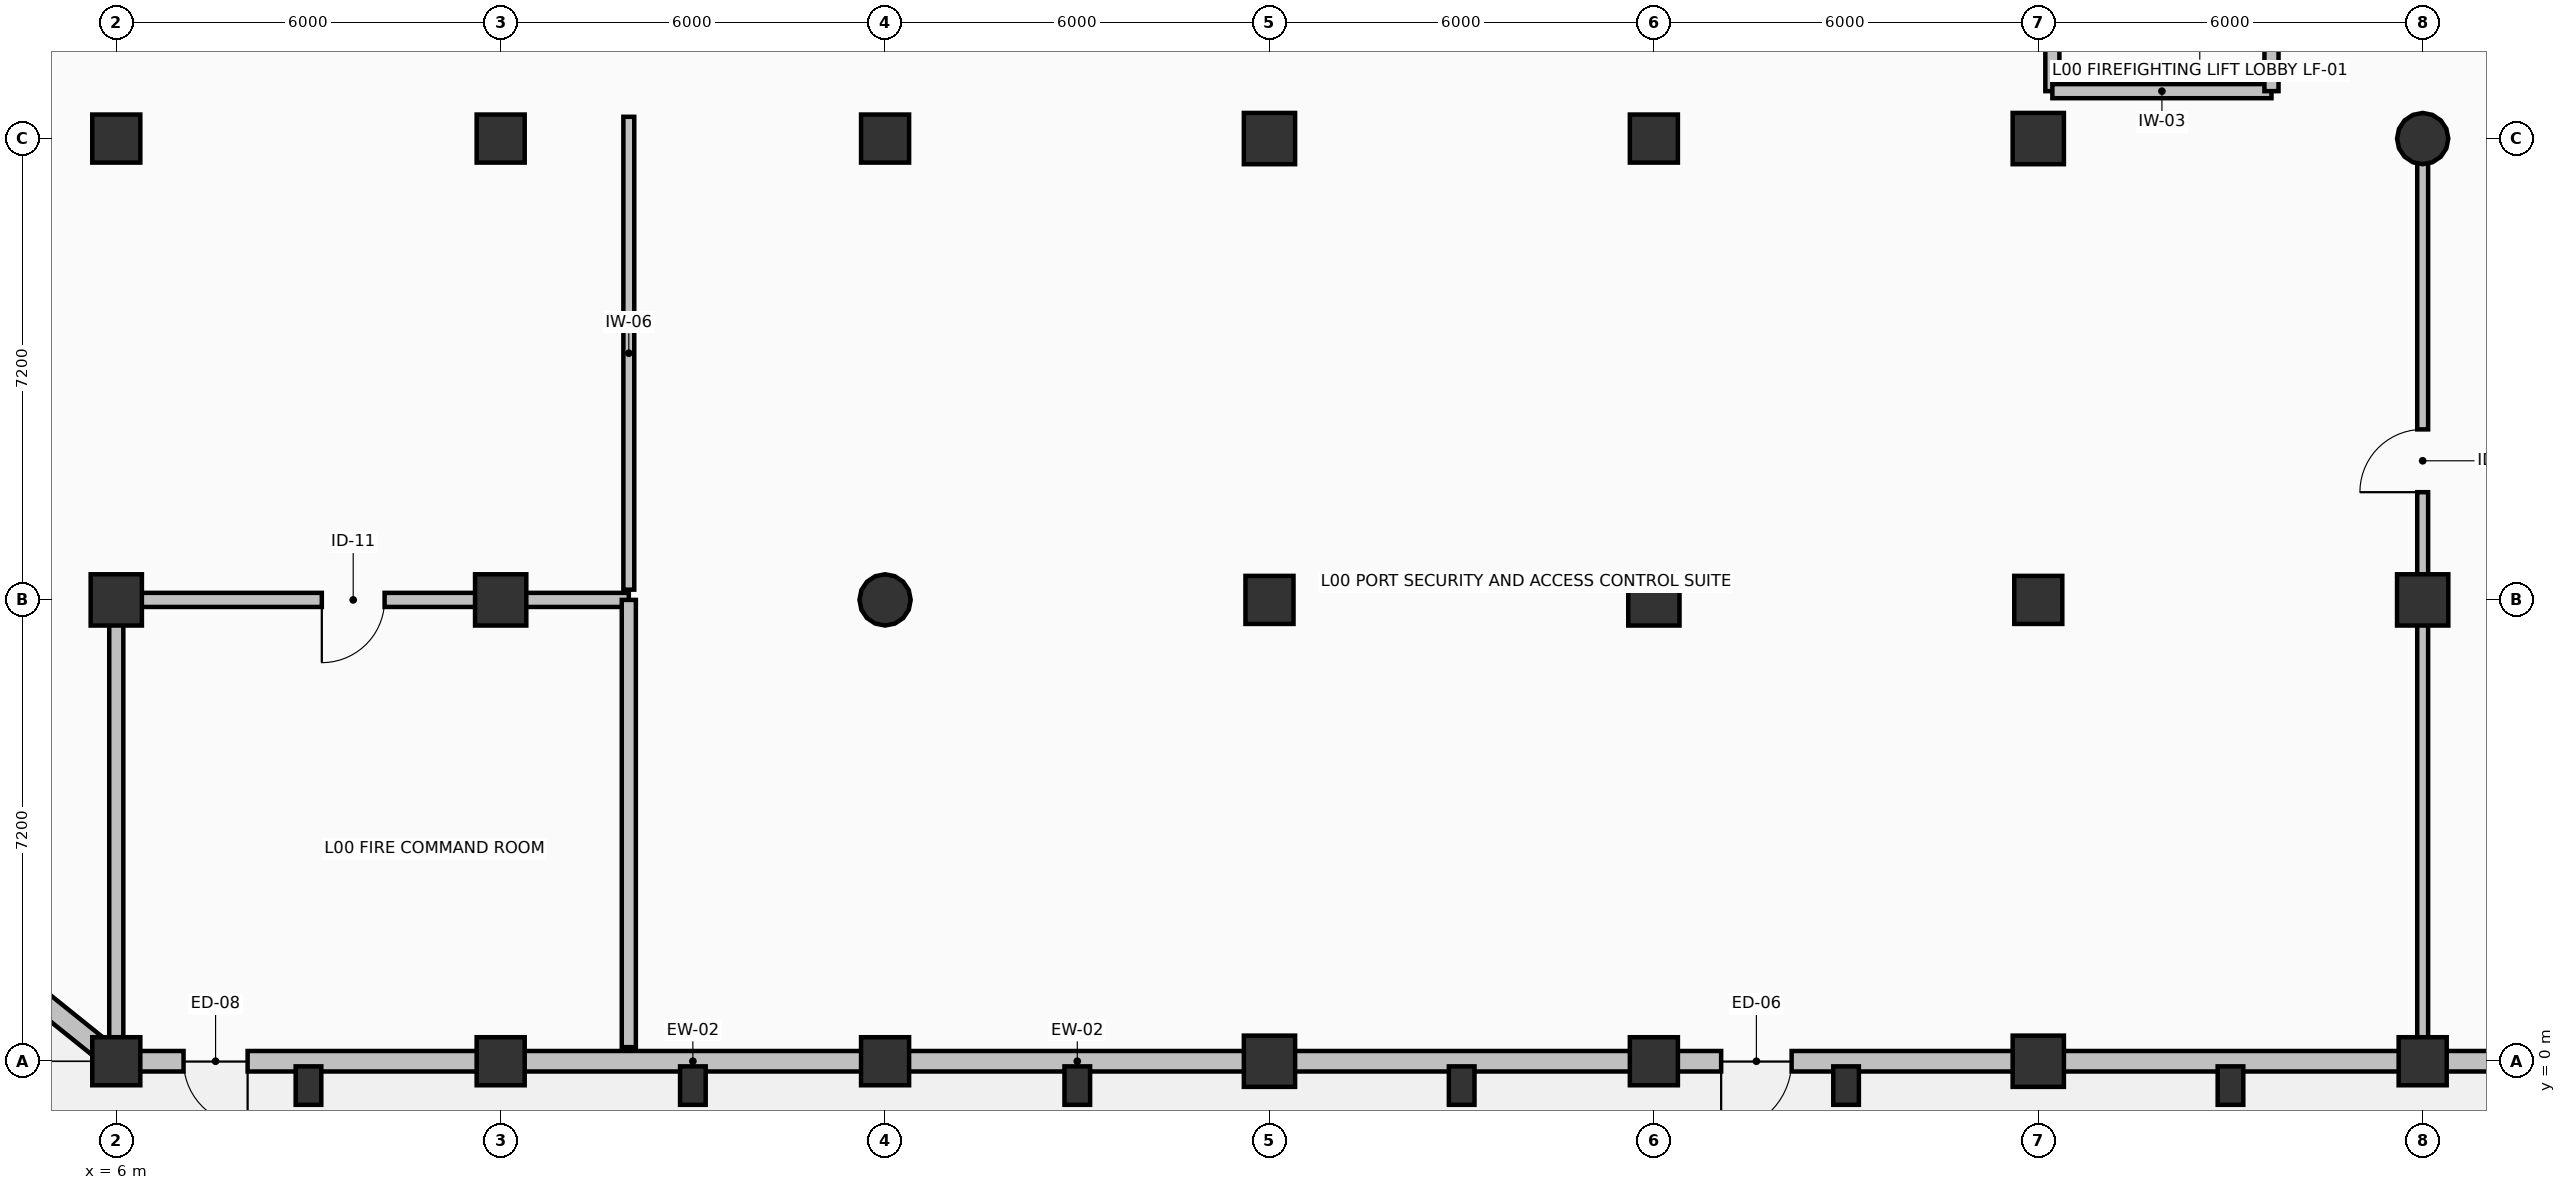
"""IFC4 building model, lengths in metres.
Left out: names, types, materials, properties, quantities, classifications, styles, units other than length and angle.
Written with IfcOpenShell. Run it as: python <this file> out.ifc"""

import sys

from ifc_helpers import new_model, si_unit, direction, frame, frame_2d, origin, origin_2d, place, context, subcontext, project, spatial, rectangle, circle, extrude, element, fill, save


model = new_model("IFC4")
c1 = context("Model", 3, precision=1e-05, world=origin(), true_north=direction((0.0, 1.0)))
c2 = subcontext(c1, "Body", "Model", "MODEL_VIEW")
j1 = project(units=[si_unit("LENGTHUNIT", "METRE"), si_unit("PLANEANGLEUNIT", "RADIAN")], contexts=[c1])
p1 = place(None, origin())
s1 = spatial("IfcSite", under=j1, at=p1, CompositionType="ELEMENT")
p2 = place(p1, origin())
s2 = spatial("IfcBuilding", under=s1, at=p2, CompositionType="ELEMENT")
p3 = place(p2, origin())
s3 = spatial("IfcBuildingStorey", under=s2, at=p3, CompositionType="ELEMENT", Elevation=0.0)
p4 = place(p3, frame((6.0, 0.0, 0.0), z_axis=(0.0, 0.0, 1.0), x_axis=(1.0, 0.0, 0.0)))
e1 = element("IfcColumn", 1, at=p4, inside=s3, PredefinedType="COLUMN", context=c2, shape_type="SweptSolid", body=[
    extrude(rectangle(XDim=0.75, YDim=0.75, at=origin_2d()), origin(), (0.0, 0.0, 1.0), 5.76),
])
p5 = place(p3, frame((6.0, 7.2, 0.0), z_axis=(0.0, 0.0, 1.0), x_axis=(1.0, 0.0, 0.0)))
e2 = element("IfcColumn", 2, at=p5, inside=s3, PredefinedType="COLUMN", context=c2, shape_type="SweptSolid", body=[
    extrude(rectangle(XDim=0.8, YDim=0.8, at=origin_2d()), origin(), (0.0, 0.0, 1.0), 5.76),
])
for number, where, z_axis, x_axis in (
    (3, (6.0, 14.4, 0.0), (0.0, 0.0, 1.0), (1.0, 0.0, 0.0)),
    (4, (12.0, 0.0, 0.0), (0.0, 0.0, 1.0), (1.0, 0.0, 0.0)),
):
    element("IfcColumn", number, at=place(p3, frame(where, z_axis=z_axis, x_axis=x_axis)), inside=s3, PredefinedType="COLUMN", context=c2, shape_type="SweptSolid", body=[
        extrude(rectangle(XDim=0.75, YDim=0.75, at=origin_2d()), origin(), (0.0, 0.0, 1.0), 5.76),
    ])
p6 = place(p3, frame((12.0, 7.2, 0.0), z_axis=(0.0, 0.0, 1.0), x_axis=(1.0, 0.0, 0.0)))
e5 = element("IfcColumn", 5, at=p6, inside=s3, PredefinedType="COLUMN", context=c2, shape_type="SweptSolid", body=[
    extrude(rectangle(XDim=0.8, YDim=0.8, at=origin_2d()), origin(), (0.0, 0.0, 1.0), 5.76),
])
for number, where, z_axis, x_axis in (
    (6, (12.0, 14.4, 0.0), (0.0, 0.0, 1.0), (1.0, 0.0, 0.0)),
    (7, (18.0, 0.0, 0.0), (0.0, 0.0, 1.0), (1.0, 0.0, 0.0)),
):
    element("IfcColumn", number, at=place(p3, frame(where, z_axis=z_axis, x_axis=x_axis)), inside=s3, PredefinedType="COLUMN", context=c2, shape_type="SweptSolid", body=[
        extrude(rectangle(XDim=0.75, YDim=0.75, at=origin_2d()), origin(), (0.0, 0.0, 1.0), 5.76),
    ])
p7 = place(p3, frame((18.0, 7.2, 0.0), z_axis=(0.0, 0.0, 1.0), x_axis=(1.0, 0.0, 0.0)))
e8 = element("IfcColumn", 8, at=p7, inside=s3, PredefinedType="COLUMN", context=c2, shape_type="SweptSolid", body=[
    extrude(circle(Radius=0.4, at=origin_2d()), origin(), (0.0, 0.0, 1.0), 5.76),
])
p8 = place(p3, frame((18.0, 14.4, 0.0), z_axis=(0.0, 0.0, 1.0), x_axis=(1.0, 0.0, 0.0)))
e9 = element("IfcColumn", 9, at=p8, inside=s3, PredefinedType="COLUMN", context=c2, shape_type="SweptSolid", body=[
    extrude(rectangle(XDim=0.75, YDim=0.75, at=origin_2d()), origin(), (0.0, 0.0, 1.0), 5.76),
])
p9 = place(p3, frame((24.0, 0.0, 0.0), z_axis=(0.0, 0.0, 1.0), x_axis=(1.0, 0.0, 0.0)))
e10 = element("IfcColumn", 10, at=p9, inside=s3, PredefinedType="COLUMN", context=c2, shape_type="SweptSolid", body=[
    extrude(rectangle(XDim=0.8, YDim=0.8, at=origin_2d()), origin(), (0.0, 0.0, 1.0), 5.76),
])
p10 = place(p3, frame((24.0, 7.2, 0.0), z_axis=(0.0, 0.0, 1.0), x_axis=(1.0, 0.0, 0.0)))
e11 = element("IfcColumn", 11, at=p10, inside=s3, PredefinedType="COLUMN", context=c2, shape_type="SweptSolid", body=[
    extrude(rectangle(XDim=0.75, YDim=0.75, at=origin_2d()), origin(), (0.0, 0.0, 1.0), 5.76),
])
p11 = place(p3, frame((24.0, 14.4, 0.0), z_axis=(0.0, 0.0, 1.0), x_axis=(1.0, 0.0, 0.0)))
e12 = element("IfcColumn", 12, at=p11, inside=s3, PredefinedType="COLUMN", context=c2, shape_type="SweptSolid", body=[
    extrude(rectangle(XDim=0.8, YDim=0.8, at=origin_2d()), origin(), (0.0, 0.0, 1.0), 5.76),
])
p12 = place(p3, frame((30.0, 0.0, 0.0), z_axis=(0.0, 0.0, 1.0), x_axis=(1.0, 0.0, 0.0)))
e13 = element("IfcColumn", 13, at=p12, inside=s3, PredefinedType="COLUMN", context=c2, shape_type="SweptSolid", body=[
    extrude(rectangle(XDim=0.75, YDim=0.75, at=origin_2d()), origin(), (0.0, 0.0, 1.0), 5.76),
])
p13 = place(p3, frame((30.0, 7.2, 0.0), z_axis=(0.0, 0.0, 1.0), x_axis=(1.0, 0.0, 0.0)))
e14 = element("IfcColumn", 14, at=p13, inside=s3, PredefinedType="COLUMN", context=c2, shape_type="SweptSolid", body=[
    extrude(rectangle(XDim=0.8, YDim=0.8, at=origin_2d()), origin(), (0.0, 0.0, 1.0), 5.76),
])
p14 = place(p3, frame((30.0, 14.4, 0.0), z_axis=(0.0, 0.0, 1.0), x_axis=(1.0, 0.0, 0.0)))
e15 = element("IfcColumn", 15, at=p14, inside=s3, PredefinedType="COLUMN", context=c2, shape_type="SweptSolid", body=[
    extrude(rectangle(XDim=0.75, YDim=0.75, at=origin_2d()), origin(), (0.0, 0.0, 1.0), 5.76),
])
p15 = place(p3, frame((36.0, 0.0, 0.0), z_axis=(0.0, 0.0, 1.0), x_axis=(1.0, 0.0, 0.0)))
e16 = element("IfcColumn", 16, at=p15, inside=s3, PredefinedType="COLUMN", context=c2, shape_type="SweptSolid", body=[
    extrude(rectangle(XDim=0.8, YDim=0.8, at=origin_2d()), origin(), (0.0, 0.0, 1.0), 5.76),
])
p16 = place(p3, frame((36.0, 7.2, 0.0), z_axis=(0.0, 0.0, 1.0), x_axis=(1.0, 0.0, 0.0)))
e17 = element("IfcColumn", 17, at=p16, inside=s3, PredefinedType="COLUMN", context=c2, shape_type="SweptSolid", body=[
    extrude(rectangle(XDim=0.75, YDim=0.75, at=origin_2d()), origin(), (0.0, 0.0, 1.0), 5.76),
])
p17 = place(p3, frame((36.0, 14.4, 0.0), z_axis=(0.0, 0.0, 1.0), x_axis=(1.0, 0.0, 0.0)))
e18 = element("IfcColumn", 18, at=p17, inside=s3, PredefinedType="COLUMN", context=c2, shape_type="SweptSolid", body=[
    extrude(rectangle(XDim=0.8, YDim=0.8, at=origin_2d()), origin(), (0.0, 0.0, 1.0), 5.76),
])
p18 = place(p3, frame((42.0, 0.0, 0.0), z_axis=(0.0, 0.0, 1.0), x_axis=(1.0, 0.0, 0.0)))
e19 = element("IfcColumn", 19, at=p18, inside=s3, PredefinedType="COLUMN", context=c2, shape_type="SweptSolid", body=[
    extrude(rectangle(XDim=0.75, YDim=0.75, at=origin_2d()), origin(), (0.0, 0.0, 1.0), 5.76),
])
p19 = place(p3, frame((42.0, 7.2, 0.0), z_axis=(0.0, 0.0, 1.0), x_axis=(1.0, 0.0, 0.0)))
e20 = element("IfcColumn", 20, at=p19, inside=s3, PredefinedType="COLUMN", context=c2, shape_type="SweptSolid", body=[
    extrude(rectangle(XDim=0.8, YDim=0.8, at=origin_2d()), origin(), (0.0, 0.0, 1.0), 5.76),
])
p20 = place(p3, frame((42.0, 14.4, 0.0), z_axis=(0.0, 0.0, 1.0), x_axis=(1.0, 0.0, 0.0)))
e21 = element("IfcColumn", 21, at=p20, inside=s3, PredefinedType="COLUMN", context=c2, shape_type="SweptSolid", body=[
    extrude(circle(Radius=0.4, at=origin_2d()), origin(), (0.0, 0.0, 1.0), 5.76),
])
for number, where, z_axis, x_axis in (
    (22, (9.0, -0.38, 0.0), (0.0, 0.0, 1.0), (1.0, 0.0, 0.0)),
    (23, (15.0, -0.38, 0.0), (0.0, 0.0, 1.0), (1.0, 0.0, 0.0)),
    (24, (21.0, -0.38, 0.0), (0.0, 0.0, 1.0), (1.0, 0.0, 0.0)),
    (25, (27.0, -0.38, 0.0), (0.0, 0.0, 1.0), (1.0, 0.0, 0.0)),
    (26, (33.0, -0.38, 0.0), (0.0, 0.0, 1.0), (1.0, 0.0, 0.0)),
    (27, (39.0, -0.38, 0.0), (0.0, 0.0, 1.0), (1.0, 0.0, 0.0)),
):
    element("IfcColumn", number, at=place(p3, frame(where, z_axis=z_axis, x_axis=x_axis)), inside=s3, PredefinedType="PILASTER", context=c2, shape_type="SweptSolid", body=[
        extrude(rectangle(XDim=0.4, YDim=0.6, at=origin_2d()), origin(), (0.0, 0.0, 1.0), 5.76),
    ])
p21 = place(p3, frame((6.0, 0.0, 0.0), z_axis=(0.0, 0.0, 1.0), x_axis=(1.0, 0.0, 0.0)))
e28 = element("IfcWall", 28, at=p21, inside=s3, PredefinedType="SOLIDWALL", context=c2, shape_type="SweptSolid", body=[
    extrude(rectangle(XDim=6.0, YDim=0.32, at=frame_2d((3.0, 0.0))), origin(), (0.0, 0.0, 1.0), 4.79),
])
p22 = place(p21, frame((1.05, 0.0, 0.0)))
e29 = element("IfcOpeningElement", 29, at=p22, cuts=e28, PredefinedType="OPENING", context=c2, shape_type="SweptSolid", body=[
    extrude(rectangle(XDim=1.0, YDim=2.1, at=frame_2d((0.5, 1.05))), frame((0.0, 0.17, 0.0), z_axis=(0.0, -1.0, 0.0), x_axis=(1.0, 0.0, 0.0)), (0.0, 0.0, 1.0), 0.34),
])
for number, where, z_axis, x_axis in (
    (30, (12.0, 0.0, 0.0), (0.0, 0.0, 1.0), (1.0, 0.0, 0.0)),
    (31, (18.0, 0.0, 0.0), (0.0, 0.0, 1.0), (1.0, 0.0, 0.0)),
    (32, (24.0, 0.0, 0.0), (0.0, 0.0, 1.0), (1.0, 0.0, 0.0)),
):
    element("IfcWall", number, at=place(p3, frame(where, z_axis=z_axis, x_axis=x_axis)), inside=s3, PredefinedType="SOLIDWALL", context=c2, shape_type="SweptSolid", body=[
        extrude(rectangle(XDim=6.0, YDim=0.32, at=frame_2d((3.0, 0.0))), origin(), (0.0, 0.0, 1.0), 4.79),
    ])
p23 = place(p3, frame((30.0, 0.0, 0.0), z_axis=(0.0, 0.0, 1.0), x_axis=(1.0, 0.0, 0.0)))
e33 = element("IfcWall", 33, at=p23, inside=s3, PredefinedType="SOLIDWALL", context=c2, shape_type="SweptSolid", body=[
    extrude(rectangle(XDim=6.0, YDim=0.32, at=frame_2d((3.0, 0.0))), origin(), (0.0, 0.0, 1.0), 4.79),
])
p24 = place(p23, frame((1.05, 0.0, 0.0)))
e34 = element("IfcOpeningElement", 34, at=p24, cuts=e33, PredefinedType="OPENING", context=c2, shape_type="SweptSolid", body=[
    extrude(rectangle(XDim=1.1, YDim=2.15, at=frame_2d((0.55, 1.075))), frame((0.0, 0.17, 0.0), z_axis=(0.0, -1.0, 0.0), x_axis=(1.0, 0.0, 0.0)), (0.0, 0.0, 1.0), 0.34),
])
for number, where, z_axis, x_axis in (
    (35, (36.0, 0.0, 0.0), (0.0, 0.0, 1.0), (1.0, 0.0, 0.0)),
    (36, (42.0, 0.0, 0.0), (0.0, 0.0, 1.0), (1.0, 0.0, 0.0)),
):
    element("IfcWall", number, at=place(p3, frame(where, z_axis=z_axis, x_axis=x_axis)), inside=s3, PredefinedType="SOLIDWALL", context=c2, shape_type="SweptSolid", body=[
        extrude(rectangle(XDim=6.0, YDim=0.32, at=frame_2d((3.0, 0.0))), origin(), (0.0, 0.0, 1.0), 4.79),
    ])
p25 = place(p3, frame((3.0, 2.412, 0.0), z_axis=(0.0, 0.0, 1.0), x_axis=(0.779393889884, -0.626534248395, 0.0)))
e37 = element("IfcWall", 37, at=p25, inside=s3, PredefinedType="SOLIDWALL", context=c2, shape_type="SweptSolid", body=[
    extrude(rectangle(XDim=3.849, YDim=0.32, at=frame_2d((1.925, 0.0))), origin(), (0.0, 0.0, 1.0), 5.46),
])
p26 = place(p25, frame((1.449, 0.0, 1.15)))
e38 = element("IfcOpeningElement", 38, at=p26, cuts=e37, PredefinedType="OPENING", context=c2, shape_type="SweptSolid", body=[
    extrude(rectangle(XDim=0.95, YDim=0.95, at=frame_2d((0.475, 0.475))), frame((0.0, 0.17, 0.0), z_axis=(0.0, -1.0, 0.0), x_axis=(1.0, 0.0, 0.0)), (0.0, 0.0, 1.0), 0.34),
])
p27 = place(p3, frame((36.22, 18.25, 0.0), z_axis=(0.0, 0.0, 1.0), x_axis=(0.0, -1.0, 0.0)))
e39 = element("IfcWall", 39, at=p27, inside=s3, PredefinedType="SOLIDWALL", context=c2, shape_type="SweptSolid", body=[
    extrude(rectangle(XDim=3.11, YDim=0.22, at=frame_2d((1.555, 0.0))), origin(), (0.0, 0.0, 1.0), 4.64),
])
p28 = place(p27, frame((1.005, 0.0, 0.0)))
e40 = element("IfcOpeningElement", 40, at=p28, cuts=e39, PredefinedType="OPENING", context=c2, shape_type="SweptSolid", body=[
    extrude(rectangle(XDim=1.1, YDim=2.15, at=frame_2d((0.55, 1.075))), frame((0.0, 0.12, 0.0), z_axis=(0.0, -1.0, 0.0), x_axis=(1.0, 0.0, 0.0)), (0.0, 0.0, 1.0), 0.24),
])
p29 = place(p3, frame((36.22, 15.14, 0.0), z_axis=(0.0, 0.0, 1.0), x_axis=(1.0, 0.0, 0.0)))
e41 = element("IfcWall", 41, at=p29, inside=s3, PredefinedType="SOLIDWALL", context=c2, shape_type="SweptSolid", body=[
    extrude(rectangle(XDim=3.42, YDim=0.22, at=frame_2d((1.71, 0.0))), origin(), (0.0, 0.0, 1.0), 5.5),
])
p30 = place(p3, frame((39.64, 15.14, 0.0), z_axis=(0.0, 0.0, 1.0), x_axis=(0.0, 1.0, 0.0)))
e42 = element("IfcWall", 42, at=p30, inside=s3, PredefinedType="SOLIDWALL", context=c2, shape_type="SweptSolid", body=[
    extrude(rectangle(XDim=3.11, YDim=0.22, at=frame_2d((1.555, 0.0))), origin(), (0.0, 0.0, 1.0), 5.5),
])
p31 = place(p3, frame((14.0, 7.2, 0.0), z_axis=(0.0, 0.0, 1.0), x_axis=(-1.0, 0.0, 0.0)))
e43 = element("IfcWall", 43, at=p31, inside=s3, PredefinedType="SOLIDWALL", context=c2, shape_type="SweptSolid", body=[
    extrude(rectangle(XDim=8.0, YDim=0.22, at=frame_2d((4.0, 0.0))), origin(), (0.0, 0.0, 1.0), 4.69),
])
p32 = place(p31, frame((3.812, 0.0, 0.0)))
e44 = element("IfcOpeningElement", 44, at=p32, cuts=e43, PredefinedType="OPENING", context=c2, shape_type="SweptSolid", body=[
    extrude(rectangle(XDim=0.98, YDim=2.12, at=frame_2d((0.49, 1.06))), frame((0.0, 0.12, 0.0), z_axis=(0.0, -1.0, 0.0), x_axis=(1.0, 0.0, 0.0)), (0.0, 0.0, 1.0), 0.24),
])
p33 = place(p3, frame((6.0, 7.2, 0.0), z_axis=(0.0, 0.0, 1.0), x_axis=(0.0, -1.0, 0.0)))
e45 = element("IfcWall", 45, at=p33, inside=s3, PredefinedType="SOLIDWALL", context=c2, shape_type="SweptSolid", body=[
    extrude(rectangle(XDim=6.918, YDim=0.22, at=frame_2d((3.459, 0.0))), origin(), (0.0, 0.0, 1.0), 4.64),
])
p34 = place(p3, frame((14.0, 0.22, 0.0), z_axis=(0.0, 0.0, 1.0), x_axis=(0.0, 1.0, 0.0)))
e46 = element("IfcWall", 46, at=p34, inside=s3, PredefinedType="SOLIDWALL", context=c2, shape_type="SweptSolid", body=[
    extrude(rectangle(XDim=6.98, YDim=0.22, at=frame_2d((3.49, 0.0))), origin(), (0.0, 0.0, 1.0), 5.2),
])
p35 = place(p3, frame((42.0, 0.22, 0.0), z_axis=(0.0, 0.0, 1.0), x_axis=(0.0, 1.0, 0.0)))
e47 = element("IfcWall", 47, at=p35, inside=s3, PredefinedType="PARTITIONING", context=c2, shape_type="SweptSolid", body=[
    extrude(rectangle(XDim=14.52, YDim=0.17, at=frame_2d((7.26, 0.0))), origin(), (0.0, 0.0, 1.0), 4.54),
])
p36 = place(p35, frame((8.661, 0.0, 0.0)))
e48 = element("IfcOpeningElement", 48, at=p36, cuts=e47, PredefinedType="OPENING", context=c2, shape_type="SweptSolid", body=[
    extrude(rectangle(XDim=0.98, YDim=2.12, at=frame_2d((0.49, 1.06))), frame((0.0, 0.095, 0.0), z_axis=(0.0, -1.0, 0.0), x_axis=(1.0, 0.0, 0.0)), (0.0, 0.0, 1.0), 0.19),
])
p37 = place(p3, frame((14.0, 14.74, 0.0), z_axis=(0.0, 0.0, 1.0), x_axis=(0.0, -1.0, 0.0)))
e49 = element("IfcWall", 49, at=p37, inside=s3, PredefinedType="PARTITIONING", context=c2, shape_type="SweptSolid", body=[
    extrude(rectangle(XDim=7.38, YDim=0.17, at=frame_2d((3.69, 0.0))), origin(), (0.0, 0.0, 1.0), 5.2),
])
p38 = place(p22, frame((1.0, 0.0, 0.0), z_axis=(0.0, 0.0, 1.0), x_axis=(-1.0, 0.0, 0.0)))
e50 = element("IfcDoor", 50, at=p38, inside=s3, OperationType="SINGLE_SWING_LEFT", PredefinedType="DOOR", context=c2, shape_type="SweptSolid", body=[
    extrude(rectangle(XDim=1.0, YDim=2.1, at=frame_2d((0.5, 1.05))), frame((0.0, 0.025, 0.0), z_axis=(0.0, -1.0, 0.0), x_axis=(1.0, 0.0, 0.0)), (0.0, 0.0, 1.0), 0.05),
])
fill(e29, e50)
p39 = place(p24, frame((1.1, 0.0, 0.0), z_axis=(0.0, 0.0, 1.0), x_axis=(-1.0, 0.0, 0.0)))
e51 = element("IfcDoor", 51, at=p39, inside=s3, OperationType="SINGLE_SWING_RIGHT", PredefinedType="DOOR", context=c2, shape_type="SweptSolid", body=[
    extrude(rectangle(XDim=1.1, YDim=2.15, at=frame_2d((0.55, 1.075))), frame((0.0, 0.025, 0.0), z_axis=(0.0, -1.0, 0.0), x_axis=(1.0, 0.0, 0.0)), (0.0, 0.0, 1.0), 0.05),
])
fill(e34, e51)
p40 = place(p32, origin())
e52 = element("IfcDoor", 52, at=p40, inside=s3, OperationType="SINGLE_SWING_RIGHT", PredefinedType="DOOR", context=c2, shape_type="SweptSolid", body=[
    extrude(rectangle(XDim=0.98, YDim=2.12, at=frame_2d((0.49, 1.06))), frame((0.0, 0.025, 0.0), z_axis=(0.0, -1.0, 0.0), x_axis=(1.0, 0.0, 0.0)), (0.0, 0.0, 1.0), 0.05),
])
fill(e44, e52)
p41 = place(p36, origin())
e53 = element("IfcDoor", 53, at=p41, inside=s3, OperationType="SINGLE_SWING_LEFT", PredefinedType="DOOR", context=c2, shape_type="SweptSolid", body=[
    extrude(rectangle(XDim=0.98, YDim=2.12, at=frame_2d((0.49, 1.06))), frame((0.0, 0.025, 0.0), z_axis=(0.0, -1.0, 0.0), x_axis=(1.0, 0.0, 0.0)), (0.0, 0.0, 1.0), 0.05),
])
fill(e48, e53)
save(model, sys.argv[1])
